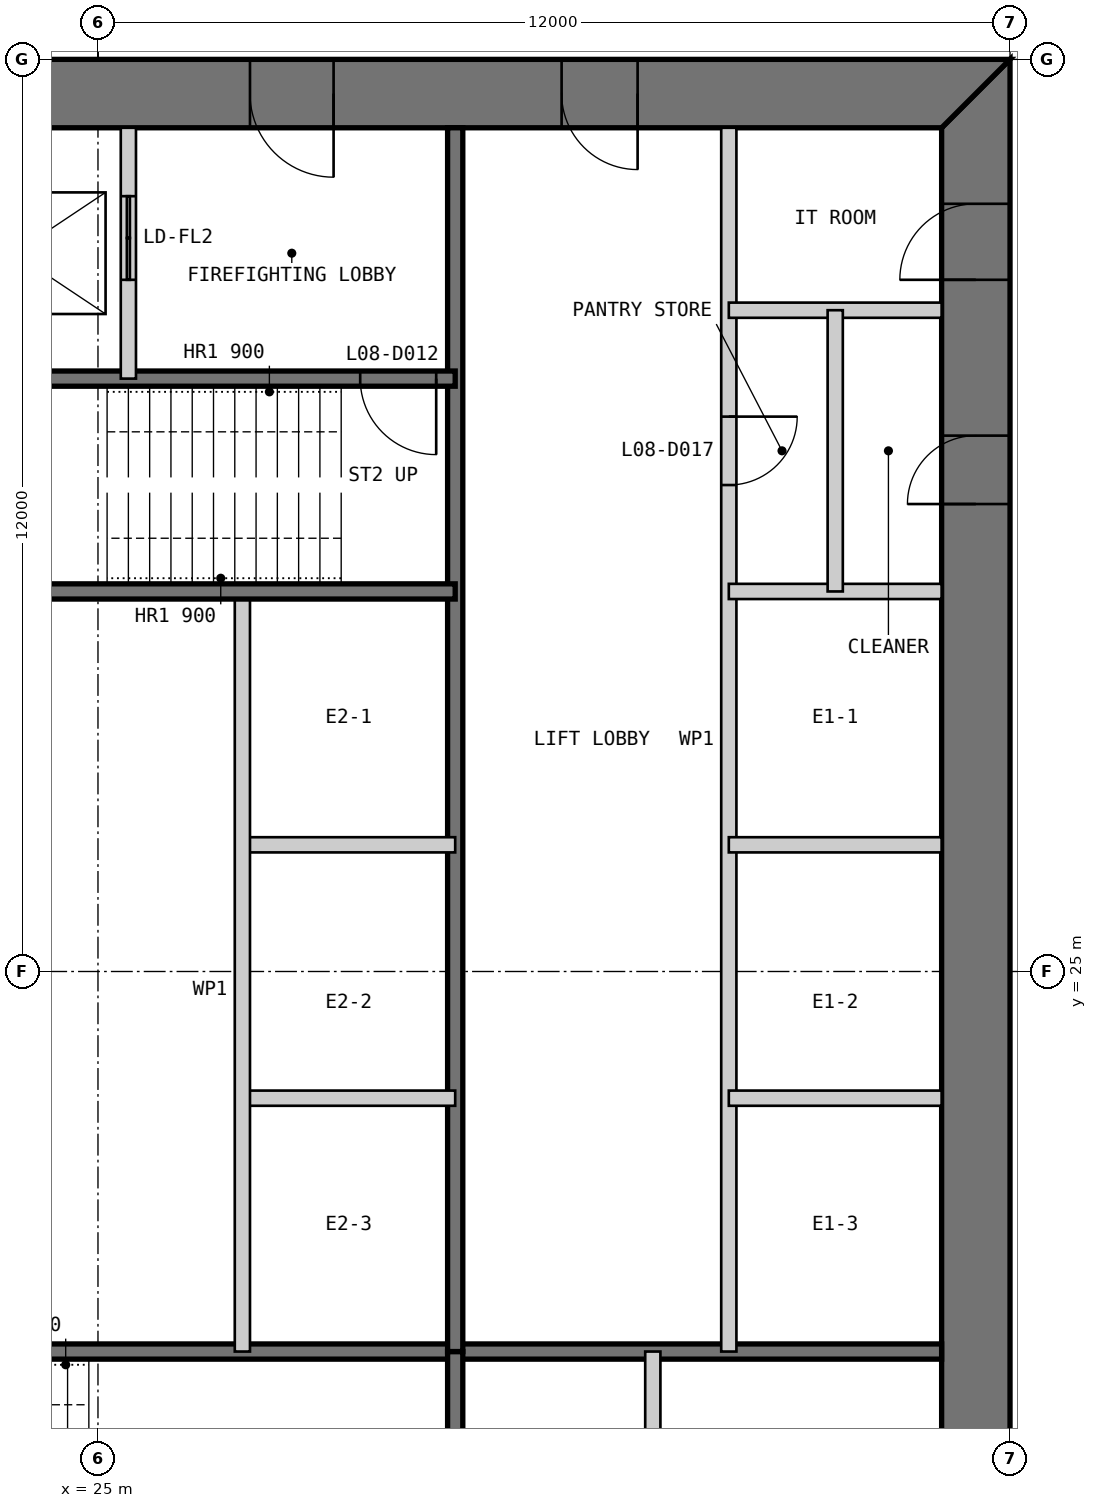
"""IFC4 building model, lengths in metres.
Left out: names, types, materials, properties, quantities, classifications, styles, units other than length and angle.
Written with IfcOpenShell. Run it as: python <this file> out.ifc"""

import sys

from ifc_helpers import new_model, si_unit, direction, frame, frame_2d, origin, place, context, subcontext, project, spatial, polyline, rectangle, outline, extrude, element, fill, save


model = new_model("IFC4")
c1 = context("Model", 3, precision=1e-05, world=origin(), true_north=direction((0.0, 1.0)))
c2 = subcontext(c1, "Body", "Model", "MODEL_VIEW")
j1 = project(units=[si_unit("LENGTHUNIT", "METRE"), si_unit("PLANEANGLEUNIT", "RADIAN")], contexts=[c1])
p1 = place(None, origin())
s1 = spatial("IfcSite", under=j1, at=p1, CompositionType="ELEMENT")
p2 = place(p1, origin())
s2 = spatial("IfcBuilding", under=s1, at=p2, CompositionType="ELEMENT")
p3 = place(p2, frame((0.0, 0.0, 39.0)))
s3 = spatial("IfcBuildingStorey", under=s2, at=p3, CompositionType="ELEMENT", Elevation=39.0)
p4 = place(p3, frame((36.55, 13.9, 0.0), z_axis=(0.0, 0.0, 1.0), x_axis=(0.0, 1.0, 0.0)))
e1 = element("IfcWall", 1, at=p4, inside=s3, PredefinedType="SHEAR", context=c2, shape_type="SweptSolid", body=[
    extrude(outline(polyline([(-0.9, -0.45), (23.1, -0.45), (22.2, 0.45), (0.0, 0.45), (-0.9, -0.45)])), origin(), (0.0, 0.0, 1.0), 4.0),
])
p5 = place(p4, frame((20.2, 0.0, 0.0)))
e2 = element("IfcOpeningElement", 2, at=p5, cuts=e1, PredefinedType="OPENING", context=c2, shape_type="SweptSolid", body=[
    extrude(rectangle(XDim=1.0, YDim=2.2, at=frame_2d((0.5, 1.1))), frame((0.0, 0.46, 0.0), z_axis=(0.0, -1.0, 0.0), x_axis=(1.0, 0.0, 0.0)), (0.0, 0.0, 1.0), 0.92),
])
p6 = place(p4, frame((17.25, 0.0, 0.0)))
e3 = element("IfcOpeningElement", 3, at=p6, cuts=e1, PredefinedType="OPENING", context=c2, shape_type="SweptSolid", body=[
    extrude(rectangle(XDim=0.9, YDim=2.2, at=frame_2d((0.45, 1.1))), frame((0.0, 0.46, 0.0), z_axis=(0.0, -1.0, 0.0), x_axis=(1.0, 0.0, 0.0)), (0.0, 0.0, 1.0), 0.92),
])
p7 = place(p3, frame((37.0, 36.55, 0.0), z_axis=(0.0, 0.0, 1.0), x_axis=(-1.0, 0.0, 0.0)))
e4 = element("IfcWall", 4, at=p7, inside=s3, PredefinedType="SHEAR", context=c2, shape_type="SweptSolid", body=[
    extrude(outline(polyline([(0.0, -0.45), (24.0, -0.45), (23.1, 0.45), (0.9, 0.45), (0.0, -0.45)])), origin(), (0.0, 0.0, 1.0), 4.0),
])
p8 = place(p7, frame((4.9, 0.0, 0.0)))
e5 = element("IfcOpeningElement", 5, at=p8, cuts=e4, PredefinedType="OPENING", context=c2, shape_type="SweptSolid", body=[
    extrude(rectangle(XDim=1.0, YDim=2.2, at=frame_2d((0.5, 1.1))), frame((0.0, 0.46, 0.0), z_axis=(0.0, -1.0, 0.0), x_axis=(1.0, 0.0, 0.0)), (0.0, 0.0, 1.0), 0.92),
])
p9 = place(p7, frame((8.9, 0.0, 0.0)))
e6 = element("IfcOpeningElement", 6, at=p9, cuts=e4, PredefinedType="OPENING", context=c2, shape_type="SweptSolid", body=[
    extrude(rectangle(XDim=1.1, YDim=2.2, at=frame_2d((0.55, 1.1))), frame((0.0, 0.46, 0.0), z_axis=(0.0, -1.0, 0.0), x_axis=(1.0, 0.0, 0.0)), (0.0, 0.0, 1.0), 0.92),
])
p10 = place(p7, frame((15.05, 0.0, 0.0)))
e7 = element("IfcOpeningElement", 7, at=p10, cuts=e4, PredefinedType="OPENING", context=c2, shape_type="SweptSolid", body=[
    extrude(rectangle(XDim=0.9, YDim=2.2, at=frame_2d((0.45, 1.1))), frame((0.0, 0.46, 0.0), z_axis=(0.0, -1.0, 0.0), x_axis=(1.0, 0.0, 0.0)), (0.0, 0.0, 1.0), 0.92),
])
p11 = place(p7, frame((17.9, 0.0, 0.0)))
e8 = element("IfcOpeningElement", 8, at=p11, cuts=e4, PredefinedType="OPENING", context=c2, shape_type="SweptSolid", body=[
    extrude(rectangle(XDim=1.0, YDim=2.2, at=frame_2d((0.5, 1.1))), frame((0.0, 0.46, 0.0), z_axis=(0.0, -1.0, 0.0), x_axis=(1.0, 0.0, 0.0)), (0.0, 0.0, 1.0), 0.92),
])
p12 = place(p7, frame((21.4, 0.0, 0.0)))
e9 = element("IfcOpeningElement", 9, at=p12, cuts=e4, PredefinedType="OPENING", context=c2, shape_type="SweptSolid", body=[
    extrude(rectangle(XDim=1.0, YDim=2.2, at=frame_2d((0.5, 1.1))), frame((0.0, 0.46, 0.0), z_axis=(0.0, -1.0, 0.0), x_axis=(1.0, 0.0, 0.0)), (0.0, 0.0, 1.0), 0.92),
])
p13 = place(p3, frame((20.3, 20.0, 0.0), z_axis=(0.0, 0.0, 1.0), x_axis=(1.0, 0.0, 0.0)))
e10 = element("IfcWall", 10, at=p13, inside=s3, PredefinedType="SOLIDWALL", context=c2, shape_type="SweptSolid", body=[
    extrude(rectangle(XDim=15.8, YDim=0.2, at=frame_2d((7.9, 0.0))), origin(), (0.0, 0.0, 1.0), 3.8),
])
p14 = place(p3, frame((29.7, 13.9, 0.0), z_axis=(0.0, 0.0, 1.0), x_axis=(0.0, 1.0, 0.0)))
e11 = element("IfcWall", 11, at=p14, inside=s3, PredefinedType="SOLIDWALL", context=c2, shape_type="SweptSolid", body=[
    extrude(rectangle(XDim=6.1, YDim=0.2, at=frame_2d((3.05, 0.0))), origin(), (0.0, 0.0, 1.0), 3.8),
])
p15 = place(p3, frame((32.3, 13.9, 0.0), z_axis=(0.0, 0.0, 1.0), x_axis=(0.0, 1.0, 0.0)))
e12 = element("IfcWall", 12, at=p15, inside=s3, PredefinedType="PARTITIONING", context=c2, shape_type="SweptSolid", body=[
    extrude(rectangle(XDim=6.1, YDim=0.2, at=frame_2d((3.05, 0.0))), origin(), (0.0, 0.0, 1.0), 3.8),
])
p16 = place(p3, frame((33.3, 36.1, 0.0), z_axis=(0.0, 0.0, 1.0), x_axis=(0.0, -1.0, 0.0)))
e13 = element("IfcWall", 13, at=p16, inside=s3, PredefinedType="PARTITIONING", context=c2, shape_type="SweptSolid", body=[
    extrude(rectangle(XDim=16.1, YDim=0.2, at=frame_2d((8.05, 0.0))), origin(), (0.0, 0.0, 1.0), 3.8),
])
p17 = place(p16, frame((3.8, 0.0, 0.0)))
e14 = element("IfcOpeningElement", 14, at=p17, cuts=e13, PredefinedType="OPENING", context=c2, shape_type="SweptSolid", body=[
    extrude(rectangle(XDim=0.9, YDim=2.2, at=frame_2d((0.45, 1.1))), frame((0.0, 0.11, 0.0), z_axis=(0.0, -1.0, 0.0), x_axis=(1.0, 0.0, 0.0)), (0.0, 0.0, 1.0), 0.22),
])
p18 = place(p3, frame((29.7, 36.1, 0.0), z_axis=(0.0, 0.0, 1.0), x_axis=(0.0, -1.0, 0.0)))
e15 = element("IfcWall", 15, at=p18, inside=s3, PredefinedType="SOLIDWALL", context=c2, shape_type="SweptSolid", body=[
    extrude(rectangle(XDim=16.1, YDim=0.2, at=frame_2d((8.05, 0.0))), origin(), (0.0, 0.0, 1.0), 3.8),
])
for number, where, z_axis, x_axis in (
    (16, (36.1, 30.0, 0.0), (0.0, 0.0, 1.0), (-1.0, 0.0, 0.0)),
    (17, (36.1, 26.667, 0.0), (0.0, 0.0, 1.0), (-1.0, 0.0, 0.0)),
    (18, (36.1, 23.333, 0.0), (0.0, 0.0, 1.0), (-1.0, 0.0, 0.0)),
    (19, (29.7, 26.667, 0.0), (0.0, 0.0, 1.0), (-1.0, 0.0, 0.0)),
    (20, (29.7, 23.333, 0.0), (0.0, 0.0, 1.0), (-1.0, 0.0, 0.0)),
):
    element("IfcWall", number, at=place(p3, frame(where, z_axis=z_axis, x_axis=x_axis)), inside=s3, PredefinedType="PARTITIONING", context=c2, shape_type="SweptSolid", body=[
        extrude(rectangle(XDim=2.8, YDim=0.2, at=frame_2d((1.4, 0.0))), origin(), (0.0, 0.0, 1.0), 3.8),
    ])
p19 = place(p3, frame((26.9, 30.0, 0.0), z_axis=(0.0, 0.0, 1.0), x_axis=(0.0, -1.0, 0.0)))
e21 = element("IfcWall", 21, at=p19, inside=s3, PredefinedType="PARTITIONING", context=c2, shape_type="SweptSolid", body=[
    extrude(rectangle(XDim=10.0, YDim=0.2, at=frame_2d((5.0, 0.0))), origin(), (0.0, 0.0, 1.0), 3.8),
])
p20 = place(p3, frame((29.7, 32.8, 0.0), z_axis=(0.0, 0.0, 1.0), x_axis=(-1.0, 0.0, 0.0)))
e22 = element("IfcWall", 22, at=p20, inside=s3, PredefinedType="SOLIDWALL", context=c2, shape_type="SweptSolid", body=[
    extrude(rectangle(XDim=9.4, YDim=0.2, at=frame_2d((4.7, 0.0))), origin(), (0.0, 0.0, 1.0), 3.8),
])
p21 = place(p20, frame((0.25, 0.0, 0.0)))
e23 = element("IfcOpeningElement", 23, at=p21, cuts=e22, PredefinedType="OPENING", context=c2, shape_type="SweptSolid", body=[
    extrude(rectangle(XDim=1.0, YDim=2.2, at=frame_2d((0.5, 1.1))), frame((0.0, 0.11, 0.0), z_axis=(0.0, -1.0, 0.0), x_axis=(1.0, 0.0, 0.0)), (0.0, 0.0, 1.0), 0.22),
])
p22 = place(p3, frame((29.7, 30.0, 0.0), z_axis=(0.0, 0.0, 1.0), x_axis=(-1.0, 0.0, 0.0)))
e24 = element("IfcWall", 24, at=p22, inside=s3, PredefinedType="SOLIDWALL", context=c2, shape_type="SweptSolid", body=[
    extrude(rectangle(XDim=15.8, YDim=0.2, at=frame_2d((7.9, 0.0))), origin(), (0.0, 0.0, 1.0), 3.8),
])
p23 = place(p3, frame((25.4, 36.1, 0.0), z_axis=(0.0, 0.0, 1.0), x_axis=(0.0, -1.0, 0.0)))
e25 = element("IfcWall", 25, at=p23, inside=s3, PredefinedType="PARTITIONING", context=c2, shape_type="SweptSolid", body=[
    extrude(rectangle(XDim=3.3, YDim=0.2, at=frame_2d((1.65, 0.0))), origin(), (0.0, 0.0, 1.0), 3.8),
])
p24 = place(p23, frame((0.9, 0.0, 0.0)))
e26 = element("IfcOpeningElement", 26, at=p24, cuts=e25, PredefinedType="OPENING", context=c2, shape_type="SweptSolid", body=[
    extrude(rectangle(XDim=1.1, YDim=2.2, at=frame_2d((0.55, 1.1))), frame((0.0, 0.11, 0.0), z_axis=(0.0, -1.0, 0.0), x_axis=(1.0, 0.0, 0.0)), (0.0, 0.0, 1.0), 0.22),
])
p25 = place(p3, frame((36.1, 33.7, 0.0), z_axis=(0.0, 0.0, 1.0), x_axis=(-1.0, 0.0, 0.0)))
e27 = element("IfcWall", 27, at=p25, inside=s3, PredefinedType="PARTITIONING", context=c2, shape_type="SweptSolid", body=[
    extrude(rectangle(XDim=2.8, YDim=0.2, at=frame_2d((1.4, 0.0))), origin(), (0.0, 0.0, 1.0), 3.8),
])
p26 = place(p3, frame((34.7, 33.7, 0.0), z_axis=(0.0, 0.0, 1.0), x_axis=(0.0, -1.0, 0.0)))
e28 = element("IfcWall", 28, at=p26, inside=s3, PredefinedType="PARTITIONING", context=c2, shape_type="SweptSolid", body=[
    extrude(rectangle(XDim=3.7, YDim=0.2, at=frame_2d((1.85, 0.0))), origin(), (0.0, 0.0, 1.0), 3.8),
])
p27 = place(p8, origin())
e29 = element("IfcDoor", 29, at=p27, inside=s3, OperationType="SINGLE_SWING_LEFT", PredefinedType="DOOR", context=c2, shape_type="SweptSolid", body=[
    extrude(rectangle(XDim=1.0, YDim=2.2, at=frame_2d((0.5, 1.1))), frame((0.0, 0.025, 0.0), z_axis=(0.0, -1.0, 0.0), x_axis=(1.0, 0.0, 0.0)), (0.0, 0.0, 1.0), 0.05),
    extrude(outline(polyline([(0.0, 0.0), (0.04, 0.0), (0.04, 2.16), (0.96, 2.16), (0.96, 0.0), (1.0, 0.0), (1.0, 2.2), (0.0, 2.2), (0.0, 0.0)])), frame((0.0, 0.3, 0.0), z_axis=(0.0, -1.0, 0.0), x_axis=(1.0, 0.0, 0.0)), (0.0, 0.0, 1.0), 0.6),
])
fill(e5, e29)
p28 = place(p9, origin())
e30 = element("IfcDoor", 30, at=p28, inside=s3, OperationType="SINGLE_SWING_LEFT", PredefinedType="DOOR", context=c2, shape_type="SweptSolid", body=[
    extrude(rectangle(XDim=1.1, YDim=2.2, at=frame_2d((0.55, 1.1))), frame((0.0, 0.025, 0.0), z_axis=(0.0, -1.0, 0.0), x_axis=(1.0, 0.0, 0.0)), (0.0, 0.0, 1.0), 0.05),
    extrude(outline(polyline([(0.0, 0.0), (0.04, 0.0), (0.04, 2.16), (1.06, 2.16), (1.06, 0.0), (1.1, 0.0), (1.1, 2.2), (0.0, 2.2), (0.0, 0.0)])), frame((0.0, 0.3, 0.0), z_axis=(0.0, -1.0, 0.0), x_axis=(1.0, 0.0, 0.0)), (0.0, 0.0, 1.0), 0.6),
])
fill(e6, e30)
p29 = place(p21, origin())
e31 = element("IfcDoor", 31, at=p29, inside=s3, OperationType="SINGLE_SWING_LEFT", PredefinedType="DOOR", context=c2, shape_type="SweptSolid", body=[
    extrude(rectangle(XDim=1.0, YDim=2.2, at=frame_2d((0.5, 1.1))), frame((0.0, 0.025, 0.0), z_axis=(0.0, -1.0, 0.0), x_axis=(1.0, 0.0, 0.0)), (0.0, 0.0, 1.0), 0.05),
])
fill(e23, e31)
p30 = place(p5, origin())
e32 = element("IfcDoor", 32, at=p30, inside=s3, OperationType="SINGLE_SWING_LEFT", PredefinedType="DOOR", context=c2, shape_type="SweptSolid", body=[
    extrude(rectangle(XDim=1.0, YDim=2.2, at=frame_2d((0.5, 1.1))), frame((0.0, 0.025, 0.0), z_axis=(0.0, -1.0, 0.0), x_axis=(1.0, 0.0, 0.0)), (0.0, 0.0, 1.0), 0.05),
    extrude(outline(polyline([(0.0, 0.0), (0.04, 0.0), (0.04, 2.16), (0.96, 2.16), (0.96, 0.0), (1.0, 0.0), (1.0, 2.2), (0.0, 2.2), (0.0, 0.0)])), frame((0.0, 0.3, 0.0), z_axis=(0.0, -1.0, 0.0), x_axis=(1.0, 0.0, 0.0)), (0.0, 0.0, 1.0), 0.6),
])
fill(e2, e32)
p31 = place(p17, origin())
e33 = element("IfcDoor", 33, at=p31, inside=s3, OperationType="SINGLE_SWING_LEFT", PredefinedType="DOOR", context=c2, shape_type="SweptSolid", body=[
    extrude(rectangle(XDim=0.9, YDim=2.2, at=frame_2d((0.45, 1.1))), frame((0.0, 0.025, 0.0), z_axis=(0.0, -1.0, 0.0), x_axis=(1.0, 0.0, 0.0)), (0.0, 0.0, 1.0), 0.05),
])
fill(e14, e33)
p32 = place(p6, origin())
e34 = element("IfcDoor", 34, at=p32, inside=s3, OperationType="SINGLE_SWING_LEFT", PredefinedType="DOOR", context=c2, shape_type="SweptSolid", body=[
    extrude(rectangle(XDim=0.9, YDim=2.2, at=frame_2d((0.45, 1.1))), frame((0.0, 0.025, 0.0), z_axis=(0.0, -1.0, 0.0), x_axis=(1.0, 0.0, 0.0)), (0.0, 0.0, 1.0), 0.05),
    extrude(outline(polyline([(0.0, 0.0), (0.04, 0.0), (0.04, 2.16), (0.86, 2.16), (0.86, 0.0), (0.9, 0.0), (0.9, 2.2), (0.0, 2.2), (0.0, 0.0)])), frame((0.0, 0.3, 0.0), z_axis=(0.0, -1.0, 0.0), x_axis=(1.0, 0.0, 0.0)), (0.0, 0.0, 1.0), 0.6),
])
fill(e3, e34)
p33 = place(p24, origin())
e35 = element("IfcDoor", 35, at=p33, inside=s3, OperationType="DOUBLE_DOOR_SLIDING", PredefinedType="DOOR", context=c2, shape_type="SweptSolid", body=[
    extrude(rectangle(XDim=1.1, YDim=2.2, at=frame_2d((0.55, 1.1))), frame((0.0, 0.025, 0.0), z_axis=(0.0, -1.0, 0.0), x_axis=(1.0, 0.0, 0.0)), (0.0, 0.0, 1.0), 0.05),
])
fill(e26, e35)
save(model, sys.argv[1])
